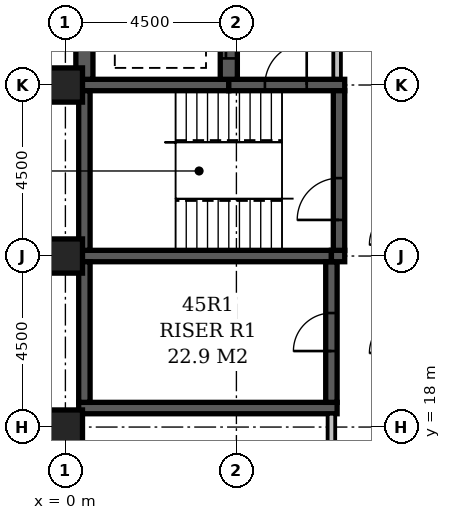
"""IFC4 building model, lengths in metres.
Left out: names, types, materials, properties, quantities, classifications, styles, units other than length and angle.
Written with IfcOpenShell. Run it as: python <this file> out.ifc"""

import sys

from ifc_helpers import new_model, si_unit, direction, frame, frame_2d, origin, origin_2d, place, context, subcontext, project, spatial, rectangle, extrude, element, fill, save


model = new_model("IFC4")
c1 = context("Model", 3, precision=1e-05, world=origin(), true_north=direction((0.0, 1.0)))
c2 = subcontext(c1, "Body", "Model", "MODEL_VIEW")
j1 = project(units=[si_unit("LENGTHUNIT", "METRE"), si_unit("PLANEANGLEUNIT", "RADIAN")], contexts=[c1])
p1 = place(None, origin())
s1 = spatial("IfcSite", under=j1, at=p1, CompositionType="ELEMENT")
p2 = place(p1, origin())
s2 = spatial("IfcBuilding", under=s1, at=p2, CompositionType="ELEMENT")
p3 = place(p2, frame((0.0, 0.0, 179.0)))
s3 = spatial("IfcBuildingStorey", under=s2, at=p3, CompositionType="ELEMENT", Elevation=179.0)
p4 = place(p3, frame((0.35, 18.5, -0.3), z_axis=(0.0, 0.0, 1.0), x_axis=(1.0, 0.0, 0.0)))
e1 = element("IfcWall", 1, at=p4, inside=s3, PredefinedType="SHEAR", context=c2, shape_type="SweptSolid", body=[
    extrude(rectangle(XDim=6.8, YDim=0.3, at=frame_2d((3.4, 0.0))), origin(), (0.0, 0.0, 1.0), 3.6),
])
p5 = place(p3, frame((0.35, 22.5, -0.3), z_axis=(0.0, 0.0, 1.0), x_axis=(1.0, 0.0, 0.0)))
e2 = element("IfcWall", 2, at=p5, inside=s3, PredefinedType="SHEAR", context=c2, shape_type="SweptSolid", body=[
    extrude(rectangle(XDim=6.65, YDim=0.3, at=frame_2d((3.325, 0.0))), origin(), (0.0, 0.0, 1.0), 3.6),
])
p6 = place(p3, frame((0.35, 27.0, -0.3), z_axis=(0.0, 0.0, 1.0), x_axis=(1.0, 0.0, 0.0)))
e3 = element("IfcWall", 3, at=p6, inside=s3, PredefinedType="SHEAR", context=c2, shape_type="SweptSolid", body=[
    extrude(rectangle(XDim=3.95, YDim=0.3, at=frame_2d((1.975, 0.0))), origin(), (0.0, 0.0, 1.0), 3.6),
])
p7 = place(p3, frame((0.5, 18.65, -0.3), z_axis=(0.0, 0.0, 1.0), x_axis=(0.0, 1.0, 0.0)))
e4 = element("IfcWall", 4, at=p7, inside=s3, PredefinedType="SHEAR", context=c2, shape_type="SweptSolid", body=[
    extrude(rectangle(XDim=3.7, YDim=0.3, at=frame_2d((1.85, 0.0))), origin(), (0.0, 0.0, 1.0), 3.6),
])
p8 = place(p3, frame((0.5, 22.65, -0.3), z_axis=(0.0, 0.0, 1.0), x_axis=(0.0, 1.0, 0.0)))
e5 = element("IfcWall", 5, at=p8, inside=s3, PredefinedType="SHEAR", context=c2, shape_type="SweptSolid", body=[
    extrude(rectangle(XDim=4.2, YDim=0.3, at=frame_2d((2.1, 0.0))), origin(), (0.0, 0.0, 1.0), 3.6),
])
p9 = place(p3, frame((0.5, 27.15, -0.3), z_axis=(0.0, 0.0, 1.0), x_axis=(0.0, 1.0, 0.0)))
e6 = element("IfcWall", 6, at=p9, inside=s3, PredefinedType="SHEAR", context=c2, shape_type="SweptSolid", body=[
    extrude(rectangle(XDim=22.125, YDim=0.45, at=frame_2d((11.062, 0.0))), origin(), (0.0, 0.0, 1.0), 3.6),
])
p10 = place(p3, frame((4.3, 27.0, -0.3), z_axis=(0.0, 0.0, 1.0), x_axis=(1.0, 0.0, 0.0)))
e7 = element("IfcWall", 7, at=p10, inside=s3, PredefinedType="SHEAR", context=c2, shape_type="SweptSolid", body=[
    extrude(rectangle(XDim=3.05, YDim=0.3, at=frame_2d((1.525, 0.0))), origin(), (0.0, 0.0, 1.0), 3.6),
])
p11 = place(p10, frame((0.95, 0.0, 0.3)))
e8 = element("IfcOpeningElement", 8, at=p11, cuts=e7, PredefinedType="OPENING", context=c2, shape_type="SweptSolid", body=[
    extrude(rectangle(XDim=1.1, YDim=2.1, at=frame_2d((0.55, 1.05))), frame((0.0, 0.162, 0.0), z_axis=(0.0, -1.0, 0.0), x_axis=(1.0, 0.0, 0.0)), (0.0, 0.0, 1.0), 0.324),
])
p12 = place(p3, frame((4.3, 27.15, -0.3), z_axis=(0.0, 0.0, 1.0), x_axis=(0.0, 1.0, 0.0)))
e9 = element("IfcWall", 9, at=p12, inside=s3, PredefinedType="SHEAR", context=c2, shape_type="SweptSolid", body=[
    extrude(rectangle(XDim=22.125, YDim=0.45, at=frame_2d((11.062, 0.0))), origin(), (0.0, 0.0, 1.0), 3.6),
])
p13 = place(p12, frame((3.05, 0.0, 0.3)))
e10 = element("IfcOpeningElement", 10, at=p13, cuts=e9, PredefinedType="OPENING", context=c2, shape_type="SweptSolid", body=[
    extrude(rectangle(XDim=1.1, YDim=2.1, at=frame_2d((0.55, 1.05))), frame((0.0, 0.237, 0.0), z_axis=(0.0, -1.0, 0.0), x_axis=(1.0, 0.0, 0.0)), (0.0, 0.0, 1.0), 0.474),
])
p14 = place(p12, frame((0.55, 0.0, 0.3)))
e11 = element("IfcOpeningElement", 11, at=p14, cuts=e9, PredefinedType="OPENING", context=c2, shape_type="SweptSolid", body=[
    extrude(rectangle(XDim=1.1, YDim=2.1, at=frame_2d((0.55, 1.05))), frame((0.0, 0.237, 0.0), z_axis=(0.0, -1.0, 0.0), x_axis=(1.0, 0.0, 0.0)), (0.0, 0.0, 1.0), 0.474),
])
p15 = place(p12, frame((20.55, 0.0, 0.3)))
e12 = element("IfcOpeningElement", 12, at=p15, cuts=e9, PredefinedType="OPENING", context=c2, shape_type="SweptSolid", body=[
    extrude(rectangle(XDim=1.1, YDim=2.1, at=frame_2d((0.55, 1.05))), frame((0.0, 0.237, 0.0), z_axis=(0.0, -1.0, 0.0), x_axis=(1.0, 0.0, 0.0)), (0.0, 0.0, 1.0), 0.474),
])
p16 = place(p12, frame((18.05, 0.0, 0.3)))
e13 = element("IfcOpeningElement", 13, at=p16, cuts=e9, PredefinedType="OPENING", context=c2, shape_type="SweptSolid", body=[
    extrude(rectangle(XDim=1.1, YDim=2.1, at=frame_2d((0.55, 1.05))), frame((0.0, 0.237, 0.0), z_axis=(0.0, -1.0, 0.0), x_axis=(1.0, 0.0, 0.0)), (0.0, 0.0, 1.0), 0.474),
])
p17 = place(p12, frame((15.55, 0.0, 0.3)))
e14 = element("IfcOpeningElement", 14, at=p17, cuts=e9, PredefinedType="OPENING", context=c2, shape_type="SweptSolid", body=[
    extrude(rectangle(XDim=1.1, YDim=2.1, at=frame_2d((0.55, 1.05))), frame((0.0, 0.237, 0.0), z_axis=(0.0, -1.0, 0.0), x_axis=(1.0, 0.0, 0.0)), (0.0, 0.0, 1.0), 0.474),
])
p18 = place(p12, frame((13.05, 0.0, 0.3)))
e15 = element("IfcOpeningElement", 15, at=p18, cuts=e9, PredefinedType="OPENING", context=c2, shape_type="SweptSolid", body=[
    extrude(rectangle(XDim=1.1, YDim=2.1, at=frame_2d((0.55, 1.05))), frame((0.0, 0.237, 0.0), z_axis=(0.0, -1.0, 0.0), x_axis=(1.0, 0.0, 0.0)), (0.0, 0.0, 1.0), 0.474),
])
p19 = place(p12, frame((10.55, 0.0, 0.3)))
e16 = element("IfcOpeningElement", 16, at=p19, cuts=e9, PredefinedType="OPENING", context=c2, shape_type="SweptSolid", body=[
    extrude(rectangle(XDim=1.1, YDim=2.1, at=frame_2d((0.55, 1.05))), frame((0.0, 0.237, 0.0), z_axis=(0.0, -1.0, 0.0), x_axis=(1.0, 0.0, 0.0)), (0.0, 0.0, 1.0), 0.474),
])
p20 = place(p12, frame((8.05, 0.0, 0.3)))
e17 = element("IfcOpeningElement", 17, at=p20, cuts=e9, PredefinedType="OPENING", context=c2, shape_type="SweptSolid", body=[
    extrude(rectangle(XDim=1.1, YDim=2.1, at=frame_2d((0.55, 1.05))), frame((0.0, 0.237, 0.0), z_axis=(0.0, -1.0, 0.0), x_axis=(1.0, 0.0, 0.0)), (0.0, 0.0, 1.0), 0.474),
])
p21 = place(p12, frame((5.55, 0.0, 0.3)))
e18 = element("IfcOpeningElement", 18, at=p21, cuts=e9, PredefinedType="OPENING", context=c2, shape_type="SweptSolid", body=[
    extrude(rectangle(XDim=1.1, YDim=2.1, at=frame_2d((0.55, 1.05))), frame((0.0, 0.237, 0.0), z_axis=(0.0, -1.0, 0.0), x_axis=(1.0, 0.0, 0.0)), (0.0, 0.0, 1.0), 0.474),
])
p22 = place(p3, frame((7.0, 18.65, -0.3), z_axis=(0.0, 0.0, 1.0), x_axis=(0.0, 1.0, 0.0)))
e19 = element("IfcWall", 19, at=p22, inside=s3, PredefinedType="SHEAR", context=c2, shape_type="SweptSolid", body=[
    extrude(rectangle(XDim=3.7, YDim=0.3, at=frame_2d((1.85, 0.0))), origin(), (0.0, 0.0, 1.0), 3.6),
])
p23 = place(p22, frame((1.35, 0.0, 0.3)))
e20 = element("IfcOpeningElement", 20, at=p23, cuts=e19, PredefinedType="OPENING", context=c2, shape_type="SweptSolid", body=[
    extrude(rectangle(XDim=1.0, YDim=2.1, at=frame_2d((0.5, 1.05))), frame((0.0, 0.162, 0.0), z_axis=(0.0, -1.0, 0.0), x_axis=(1.0, 0.0, 0.0)), (0.0, 0.0, 1.0), 0.324),
])
p24 = place(p3, frame((7.0, 22.5, -0.3), z_axis=(0.0, 0.0, 1.0), x_axis=(1.0, 0.0, 0.0)))
e21 = element("IfcWall", 21, at=p24, inside=s3, PredefinedType="SHEAR", context=c2, shape_type="SweptSolid", body=[
    extrude(rectangle(XDim=0.35, YDim=0.3, at=frame_2d((0.175, 0.0))), origin(), (0.0, 0.0, 1.0), 3.6),
])
p25 = place(p3, frame((7.2, 22.65, -0.3), z_axis=(0.0, 0.0, 1.0), x_axis=(0.0, 1.0, 0.0)))
e22 = element("IfcWall", 22, at=p25, inside=s3, PredefinedType="SHEAR", context=c2, shape_type="SweptSolid", body=[
    extrude(rectangle(XDim=4.2, YDim=0.3, at=frame_2d((2.1, 0.0))), origin(), (0.0, 0.0, 1.0), 3.6),
])
p26 = place(p25, frame((0.8, 0.0, 0.3)))
e23 = element("IfcOpeningElement", 23, at=p26, cuts=e22, PredefinedType="OPENING", context=c2, shape_type="SweptSolid", body=[
    extrude(rectangle(XDim=1.1, YDim=2.1, at=frame_2d((0.55, 1.05))), frame((0.0, 0.162, 0.0), z_axis=(0.0, -1.0, 0.0), x_axis=(1.0, 0.0, 0.0)), (0.0, 0.0, 1.0), 0.324),
])
for number, where, z_axis, x_axis in (
    (24, (0.0, 18.0, -0.3), (0.0, 0.0, 1.0), (1.0, 0.0, 0.0)),
    (25, (0.0, 22.5, -0.3), (0.0, 0.0, 1.0), (1.0, 0.0, 0.0)),
    (26, (0.0, 27.0, -0.3), (0.0, 0.0, 1.0), (1.0, 0.0, 0.0)),
):
    element("IfcColumn", number, at=place(p3, frame(where, z_axis=z_axis, x_axis=x_axis)), inside=s3, PredefinedType="COLUMN", context=c2, shape_type="SweptSolid", body=[
        extrude(rectangle(XDim=0.9, YDim=0.9, at=origin_2d()), origin(), (0.0, 0.0, 1.0), 3.6),
    ])
p27 = place(p3, frame((7.15, 27.17, 0.0), z_axis=(0.0, 0.0, 1.0), x_axis=(0.0, 1.0, 0.0)))
e27 = element("IfcWall", 27, at=p27, inside=s3, PredefinedType="PARTITIONING", context=c2, shape_type="SweptSolid", body=[
    extrude(rectangle(XDim=4.83, YDim=0.2, at=frame_2d((2.415, 0.0))), origin(), (0.0, 0.0, 1.0), 3.3),
])
p28 = place(p27, frame((1.73, 0.0, 0.0)))
e28 = element("IfcOpeningElement", 28, at=p28, cuts=e27, PredefinedType="OPENING", context=c2, shape_type="SweptSolid", body=[
    extrude(rectangle(XDim=1.2, YDim=2.1, at=frame_2d((0.6, 1.05))), frame((0.0, 0.112, 0.0), z_axis=(0.0, -1.0, 0.0), x_axis=(1.0, 0.0, 0.0)), (0.0, 0.0, 1.0), 0.224),
])
p29 = place(p3, frame((7.0, 14.15, 0.0), z_axis=(0.0, 0.0, 1.0), x_axis=(0.0, 1.0, 0.0)))
e29 = element("IfcWall", 29, at=p29, inside=s3, PredefinedType="PARTITIONING", context=c2, shape_type="SweptSolid", body=[
    extrude(rectangle(XDim=4.2, YDim=0.2, at=frame_2d((2.1, 0.0))), origin(), (0.0, 0.0, 1.0), 3.3),
])
p30 = place(p29, frame((1.6, 0.0, 0.0)))
e30 = element("IfcOpeningElement", 30, at=p30, cuts=e29, PredefinedType="OPENING", context=c2, shape_type="SweptSolid", body=[
    extrude(rectangle(XDim=1.0, YDim=2.1, at=frame_2d((0.5, 1.05))), frame((0.0, 0.112, 0.0), z_axis=(0.0, -1.0, 0.0), x_axis=(1.0, 0.0, 0.0)), (0.0, 0.0, 1.0), 0.224),
])
p31 = place(p14, origin())
e31 = element("IfcDoor", 31, at=p31, inside=s3, OperationType="SLIDING_TO_LEFT", PredefinedType="DOOR", context=c2, shape_type="SweptSolid", body=[
    extrude(rectangle(XDim=1.1, YDim=2.1, at=frame_2d((0.55, 1.05))), frame((0.0, 0.025, 0.0), z_axis=(0.0, -1.0, 0.0), x_axis=(1.0, 0.0, 0.0)), (0.0, 0.0, 1.0), 0.05),
])
fill(e11, e31)
p32 = place(p23, origin())
e32 = element("IfcDoor", 32, at=p32, inside=s3, OperationType="SINGLE_SWING_LEFT", PredefinedType="DOOR", context=c2, shape_type="SweptSolid", body=[
    extrude(rectangle(XDim=1.0, YDim=2.1, at=frame_2d((0.5, 1.05))), frame((0.0, 0.025, 0.0), z_axis=(0.0, -1.0, 0.0), x_axis=(1.0, 0.0, 0.0)), (0.0, 0.0, 1.0), 0.05),
])
fill(e20, e32)
p33 = place(p11, frame((1.1, 0.0, 0.0), z_axis=(0.0, 0.0, 1.0), x_axis=(-1.0, 0.0, 0.0)))
e33 = element("IfcDoor", 33, at=p33, inside=s3, OperationType="SINGLE_SWING_LEFT", PredefinedType="DOOR", context=c2, shape_type="SweptSolid", body=[
    extrude(rectangle(XDim=1.1, YDim=2.1, at=frame_2d((0.55, 1.05))), frame((0.0, 0.025, 0.0), z_axis=(0.0, -1.0, 0.0), x_axis=(1.0, 0.0, 0.0)), (0.0, 0.0, 1.0), 0.05),
])
fill(e8, e33)
p34 = place(p26, origin())
e34 = element("IfcDoor", 34, at=p34, inside=s3, OperationType="SINGLE_SWING_LEFT", PredefinedType="DOOR", context=c2, shape_type="SweptSolid", body=[
    extrude(rectangle(XDim=1.1, YDim=2.1, at=frame_2d((0.55, 1.05))), frame((0.0, 0.025, 0.0), z_axis=(0.0, -1.0, 0.0), x_axis=(1.0, 0.0, 0.0)), (0.0, 0.0, 1.0), 0.05),
])
fill(e23, e34)
save(model, sys.argv[1])
